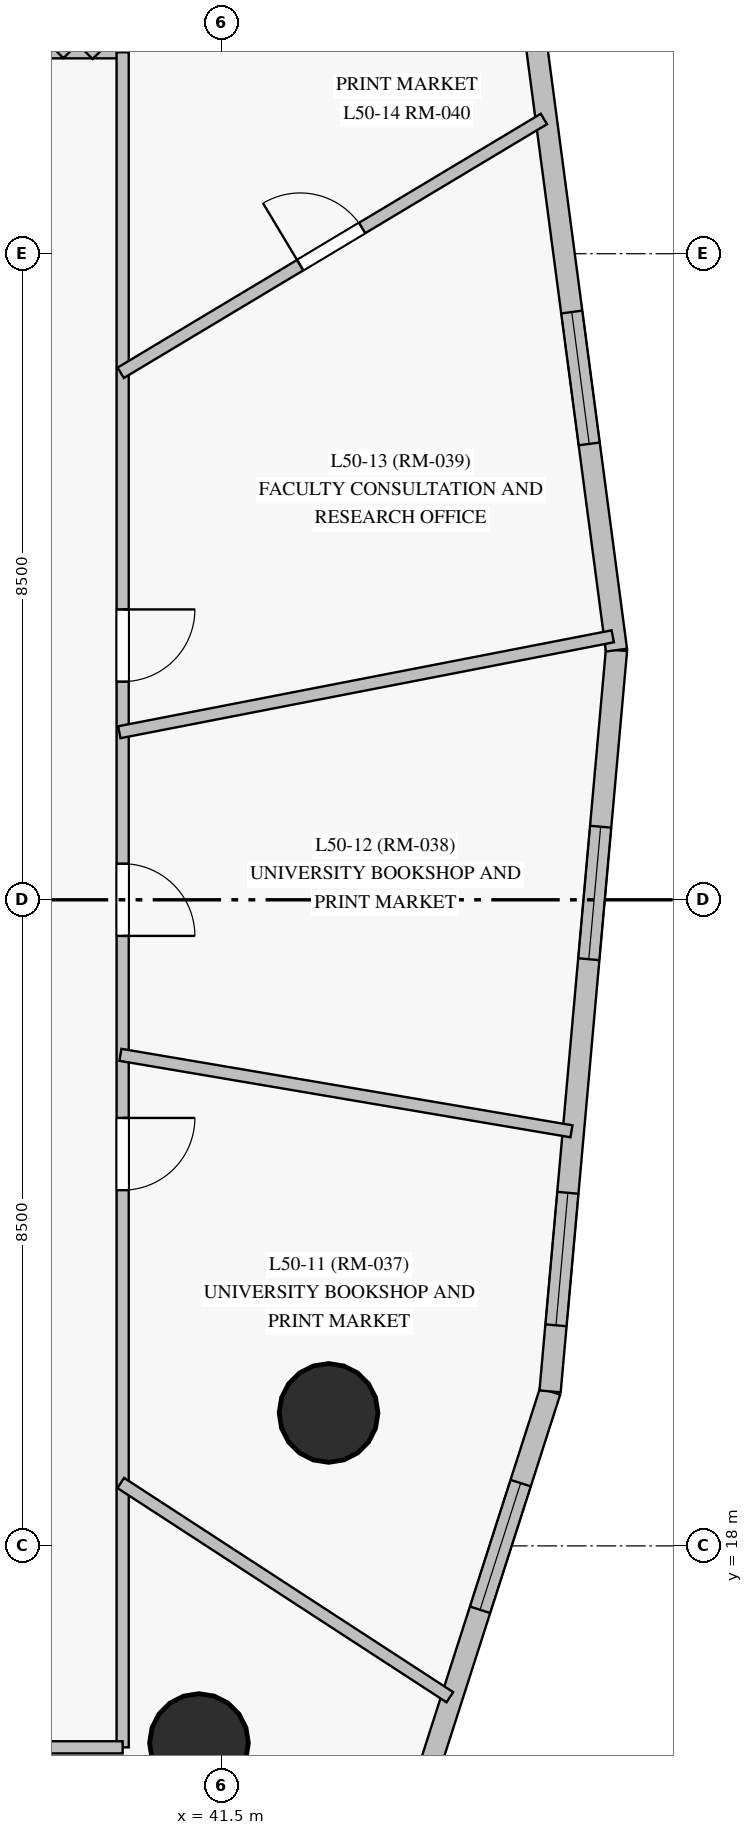
"""IFC4 building model, lengths in metres.
Left out: names, types, materials, properties, quantities, classifications, styles, units other than length and angle.
Written with IfcOpenShell. Run it as: python <this file> out.ifc"""

import sys

from ifc_helpers import new_model, si_unit, direction, frame, frame_2d, origin, origin_with_axes, origin_2d, place, context, subcontext, project, spatial, rectangle, circle, extrude, source, transform, mapped, element, fill, save


model = new_model("IFC4")
c1 = context("Model", 3, precision=1e-05, world=origin(), true_north=direction((0.0, 1.0)))
c2 = subcontext(c1, "Body", "Model", "MODEL_VIEW")
j1 = project(units=[si_unit("LENGTHUNIT", "METRE"), si_unit("PLANEANGLEUNIT", "RADIAN")], contexts=[c1])
p1 = place(None, origin())
s1 = spatial("IfcSite", under=j1, at=p1, CompositionType="ELEMENT")
p2 = place(p1, origin())
s2 = spatial("IfcBuilding", under=s1, at=p2, CompositionType="ELEMENT")
p3 = place(p2, frame((0.0, 0.0, 174.85)))
s3 = spatial("IfcBuildingStorey", under=s2, at=p3, CompositionType="ELEMENT", Elevation=174.85)
m1 = source(origin_with_axes(), c2, "Body", "SweptSolid", [
    extrude(circle(Radius=0.65, at=origin_2d()), origin(), (0.0, 0.0, 1.0), 3.05),
])
for number, where, z_axis, x_axis in (
    (1, (42.909, 19.749, 0.0), (0.0, 0.0, 1.0), (1.0, 0.0, 0.0)),
    (2, (41.204, 15.406, 0.0), (0.0, 0.0, 1.0), (1.0, 0.0, 0.0)),
):
    element("IfcColumn", number, at=place(p3, frame(where, z_axis=z_axis, x_axis=x_axis)), inside=s3, PredefinedType="COLUMN", context=c2, shape_type="MappedRepresentation", body=[
        mapped(m1, transform((0.0, 0.0, 0.0), scale=1.0)),
    ])
p4 = place(p3, frame((43.142, 11.669, 0.0), z_axis=(0.0, 0.0, 1.0), x_axis=(0.305307233787, 0.95225390154, 0.0)))
e3 = element("IfcWall", 3, at=p4, inside=s3, PredefinedType="SOLIDWALL", context=c2, shape_type="SweptSolid", body=[
    extrude(rectangle(XDim=8.783, YDim=0.28, at=frame_2d((4.391, 0.0))), origin(), (0.0, 0.0, 1.0), 2.825),
])
p5 = place(p4, frame((1.434, 0.0, 0.85)))
e4 = element("IfcOpeningElement", 4, at=p5, cuts=e3, PredefinedType="OPENING", context=c2, shape_type="SweptSolid", body=[
    extrude(rectangle(XDim=1.75, YDim=1.65, at=frame_2d((0.875, 0.825))), frame((0.0, 0.15, 0.0), z_axis=(0.0, -1.0, 0.0), x_axis=(1.0, 0.0, 0.0)), (0.0, 0.0, 1.0), 0.3),
])
p6 = place(p4, frame((5.765, 0.0, 0.85)))
e5 = element("IfcOpeningElement", 5, at=p6, cuts=e3, PredefinedType="OPENING", context=c2, shape_type="SweptSolid", body=[
    extrude(rectangle(XDim=1.75, YDim=1.65, at=frame_2d((0.875, 0.825))), frame((0.0, 0.15, 0.0), z_axis=(0.0, -1.0, 0.0), x_axis=(1.0, 0.0, 0.0)), (0.0, 0.0, 1.0), 0.3),
])
p7 = place(p3, frame((45.823, 20.033, 0.0), z_axis=(0.0, 0.0, 1.0), x_axis=(0.089242924974, 0.996009889681, 0.0)))
e6 = element("IfcWall", 6, at=p7, inside=s3, PredefinedType="SOLIDWALL", context=c2, shape_type="SweptSolid", body=[
    extrude(rectangle(XDim=9.791, YDim=0.28, at=frame_2d((4.896, 0.0))), origin(), (0.0, 0.0, 1.0), 2.825),
])
p8 = place(p7, frame((0.873, 0.0, 0.85)))
e7 = element("IfcOpeningElement", 7, at=p8, cuts=e6, PredefinedType="OPENING", context=c2, shape_type="SweptSolid", body=[
    extrude(rectangle(XDim=1.75, YDim=1.65, at=frame_2d((0.875, 0.825))), frame((0.0, 0.15, 0.0), z_axis=(0.0, -1.0, 0.0), x_axis=(1.0, 0.0, 0.0)), (0.0, 0.0, 1.0), 0.3),
])
p9 = place(p7, frame((5.708, 0.0, 0.85)))
e8 = element("IfcOpeningElement", 8, at=p9, cuts=e6, PredefinedType="OPENING", context=c2, shape_type="SweptSolid", body=[
    extrude(rectangle(XDim=1.75, YDim=1.65, at=frame_2d((0.875, 0.825))), frame((0.0, 0.15, 0.0), z_axis=(0.0, -1.0, 0.0), x_axis=(1.0, 0.0, 0.0)), (0.0, 0.0, 1.0), 0.3),
])
p10 = place(p3, frame((46.697, 29.785, 0.0), z_axis=(0.0, 0.0, 1.0), x_axis=(-0.131149267022, 0.991362632824, 0.0)))
e9 = element("IfcWall", 9, at=p10, inside=s3, PredefinedType="SOLIDWALL", context=c2, shape_type="SweptSolid", body=[
    extrude(rectangle(XDim=14.125, YDim=0.28, at=frame_2d((7.063, 0.0))), origin(), (0.0, 0.0, 1.0), 2.825),
])
p11 = place(p10, frame((2.737, 0.0, 0.85)))
e10 = element("IfcOpeningElement", 10, at=p11, cuts=e9, PredefinedType="OPENING", context=c2, shape_type="SweptSolid", body=[
    extrude(rectangle(XDim=1.75, YDim=1.65, at=frame_2d((0.875, 0.825))), frame((0.0, 0.15, 0.0), z_axis=(0.0, -1.0, 0.0), x_axis=(1.0, 0.0, 0.0)), (0.0, 0.0, 1.0), 0.3),
])
p12 = place(p10, frame((9.194, 0.0, 0.85)))
e11 = element("IfcOpeningElement", 11, at=p12, cuts=e9, PredefinedType="OPENING", context=c2, shape_type="SweptSolid", body=[
    extrude(rectangle(XDim=1.75, YDim=1.65, at=frame_2d((0.875, 0.825))), frame((0.0, 0.15, 0.0), z_axis=(0.0, -1.0, 0.0), x_axis=(1.0, 0.0, 0.0)), (0.0, 0.0, 1.0), 0.3),
])
p13 = place(p3, frame((16.7, 37.65, 0.0), z_axis=(0.0, 0.0, 1.0), x_axis=(1.0, 0.0, 0.0)))
e12 = element("IfcWall", 12, at=p13, inside=s3, PredefinedType="PARTITIONING", context=c2, shape_type="SweptSolid", body=[
    extrude(rectangle(XDim=23.5, YDim=0.16, at=frame_2d((11.75, 0.0))), origin(), (0.0, 0.0, 1.0), 2.375),
])
p14 = place(p13, frame((17.15, 0.0, 0.0)))
e13 = element("IfcOpeningElement", 13, at=p14, cuts=e12, PredefinedType="OPENING", context=c2, shape_type="SweptSolid", body=[
    extrude(rectangle(XDim=0.95, YDim=2.15, at=frame_2d((0.475, 1.075))), frame((0.0, 0.09, 0.0), z_axis=(0.0, -1.0, 0.0), x_axis=(1.0, 0.0, 0.0)), (0.0, 0.0, 1.0), 0.18),
])
p15 = place(p13, frame((14.31, 0.0, 0.0)))
e14 = element("IfcOpeningElement", 14, at=p15, cuts=e12, PredefinedType="OPENING", context=c2, shape_type="SweptSolid", body=[
    extrude(rectangle(XDim=0.95, YDim=2.15, at=frame_2d((0.475, 1.075))), frame((0.0, 0.09, 0.0), z_axis=(0.0, -1.0, 0.0), x_axis=(1.0, 0.0, 0.0)), (0.0, 0.0, 1.0), 0.18),
])
p16 = place(p13, frame((11.915, 0.0, 0.0)))
e15 = element("IfcOpeningElement", 15, at=p16, cuts=e12, PredefinedType="OPENING", context=c2, shape_type="SweptSolid", body=[
    extrude(rectangle(XDim=0.95, YDim=2.15, at=frame_2d((0.475, 1.075))), frame((0.0, 0.09, 0.0), z_axis=(0.0, -1.0, 0.0), x_axis=(1.0, 0.0, 0.0)), (0.0, 0.0, 1.0), 0.18),
])
p17 = place(p13, frame((7.75, 0.0, 0.0)))
e16 = element("IfcOpeningElement", 16, at=p17, cuts=e12, PredefinedType="OPENING", context=c2, shape_type="SweptSolid", body=[
    extrude(rectangle(XDim=0.95, YDim=2.15, at=frame_2d((0.475, 1.075))), frame((0.0, 0.09, 0.0), z_axis=(0.0, -1.0, 0.0), x_axis=(1.0, 0.0, 0.0)), (0.0, 0.0, 1.0), 0.18),
])
p18 = place(p13, frame((5.01, 0.0, 0.0)))
e17 = element("IfcOpeningElement", 17, at=p18, cuts=e12, PredefinedType="OPENING", context=c2, shape_type="SweptSolid", body=[
    extrude(rectangle(XDim=0.95, YDim=2.15, at=frame_2d((0.475, 1.075))), frame((0.0, 0.09, 0.0), z_axis=(0.0, -1.0, 0.0), x_axis=(1.0, 0.0, 0.0)), (0.0, 0.0, 1.0), 0.18),
])
p19 = place(p13, frame((0.257, 0.0, 0.0)))
e18 = element("IfcOpeningElement", 18, at=p19, cuts=e12, PredefinedType="OPENING", context=c2, shape_type="SweptSolid", body=[
    extrude(rectangle(XDim=0.95, YDim=2.15, at=frame_2d((0.475, 1.075))), frame((0.0, 0.09, 0.0), z_axis=(0.0, -1.0, 0.0), x_axis=(1.0, 0.0, 0.0)), (0.0, 0.0, 1.0), 0.18),
])
p20 = place(p3, frame((40.2, 37.65, 0.0), z_axis=(0.0, 0.0, 1.0), x_axis=(0.0, -1.0, 0.0)))
e19 = element("IfcWall", 19, at=p20, inside=s3, PredefinedType="PARTITIONING", context=c2, shape_type="SweptSolid", body=[
    extrude(rectangle(XDim=22.3, YDim=0.16, at=frame_2d((11.15, 0.0))), origin(), (0.0, 0.0, 1.0), 2.375),
])
p21 = place(p20, frame((14.02, 0.0, 0.0)))
e20 = element("IfcOpeningElement", 20, at=p21, cuts=e19, PredefinedType="OPENING", context=c2, shape_type="SweptSolid", body=[
    extrude(rectangle(XDim=0.95, YDim=2.15, at=frame_2d((0.475, 1.075))), frame((0.0, 0.09, 0.0), z_axis=(0.0, -1.0, 0.0), x_axis=(1.0, 0.0, 0.0)), (0.0, 0.0, 1.0), 0.18),
])
p22 = place(p20, frame((10.675, 0.0, 0.0)))
e21 = element("IfcOpeningElement", 21, at=p22, cuts=e19, PredefinedType="OPENING", context=c2, shape_type="SweptSolid", body=[
    extrude(rectangle(XDim=0.95, YDim=2.15, at=frame_2d((0.475, 1.075))), frame((0.0, 0.09, 0.0), z_axis=(0.0, -1.0, 0.0), x_axis=(1.0, 0.0, 0.0)), (0.0, 0.0, 1.0), 0.18),
])
p23 = place(p20, frame((7.33, 0.0, 0.0)))
e22 = element("IfcOpeningElement", 22, at=p23, cuts=e19, PredefinedType="OPENING", context=c2, shape_type="SweptSolid", body=[
    extrude(rectangle(XDim=0.95, YDim=2.15, at=frame_2d((0.475, 1.075))), frame((0.0, 0.09, 0.0), z_axis=(0.0, -1.0, 0.0), x_axis=(1.0, 0.0, 0.0)), (0.0, 0.0, 1.0), 0.18),
])
p24 = place(p3, frame((40.2, 15.35, 0.0), z_axis=(0.0, 0.0, 1.0), x_axis=(-1.0, 0.0, 0.0)))
e23 = element("IfcWall", 23, at=p24, inside=s3, PredefinedType="PARTITIONING", context=c2, shape_type="SweptSolid", body=[
    extrude(rectangle(XDim=10.65, YDim=0.16, at=frame_2d((5.325, 0.0))), origin(), (0.0, 0.0, 1.0), 2.275),
])
p25 = place(p24, frame((4.85, 0.0, 0.0)))
e24 = element("IfcOpeningElement", 24, at=p25, cuts=e23, PredefinedType="OPENING", context=c2, shape_type="SweptSolid", body=[
    extrude(rectangle(XDim=0.95, YDim=2.15, at=frame_2d((0.475, 1.075))), frame((0.0, 0.09, 0.0), z_axis=(0.0, -1.0, 0.0), x_axis=(1.0, 0.0, 0.0)), (0.0, 0.0, 1.0), 0.18),
])
p26 = place(p24, frame((1.897, 0.0, 0.0)))
e25 = element("IfcOpeningElement", 25, at=p26, cuts=e23, PredefinedType="OPENING", context=c2, shape_type="SweptSolid", body=[
    extrude(rectangle(XDim=0.95, YDim=2.15, at=frame_2d((0.475, 1.075))), frame((0.0, 0.09, 0.0), z_axis=(0.0, -1.0, 0.0), x_axis=(1.0, 0.0, 0.0)), (0.0, 0.0, 1.0), 0.18),
])
p27 = place(p3, frame((39.748, 37.618, 0.0), z_axis=(0.0, 0.0, 1.0), x_axis=(0.708505208344, 0.705705582909, 0.0)))
e26 = element("IfcWall", 26, at=p27, inside=s3, PredefinedType="PARTITIONING", context=c2, shape_type="SweptSolid", body=[
    extrude(rectangle(XDim=7.325, YDim=0.16, at=frame_2d((3.663, 0.0))), origin(), (0.0, 0.0, 1.0), 2.825),
])
p28 = place(p3, frame((40.156, 28.705, 0.0), z_axis=(0.0, 0.0, 1.0), x_axis=(0.981629797494, 0.190795546784, 0.0)))
e27 = element("IfcWall", 27, at=p28, inside=s3, PredefinedType="PARTITIONING", context=c2, shape_type="SweptSolid", body=[
    extrude(rectangle(XDim=6.613, YDim=0.16, at=frame_2d((3.307, 0.0))), origin(), (0.0, 0.0, 1.0), 2.825),
])
p29 = place(p3, frame((40.174, 33.433, 0.0), z_axis=(0.0, 0.0, 1.0), x_axis=(0.857549328382, 0.514401739297, 0.0)))
e28 = element("IfcWall", 28, at=p29, inside=s3, PredefinedType="PARTITIONING", context=c2, shape_type="SweptSolid", body=[
    extrude(rectangle(XDim=6.492, YDim=0.16, at=frame_2d((3.246, 0.0))), origin(), (0.0, 0.0, 1.0), 2.825),
])
p30 = place(p29, frame((2.754, 0.0, 0.0)))
e29 = element("IfcOpeningElement", 29, at=p30, cuts=e28, PredefinedType="OPENING", context=c2, shape_type="SweptSolid", body=[
    extrude(rectangle(XDim=0.95, YDim=2.15, at=frame_2d((0.475, 1.075))), frame((0.0, 0.09, 0.0), z_axis=(0.0, -1.0, 0.0), x_axis=(1.0, 0.0, 0.0)), (0.0, 0.0, 1.0), 0.18),
])
p31 = place(p3, frame((40.17, 24.46, 0.0), z_axis=(0.0, 0.0, 1.0), x_axis=(0.985928474101, -0.167167712066, 0.0)))
e30 = element("IfcWall", 30, at=p31, inside=s3, PredefinedType="PARTITIONING", context=c2, shape_type="SweptSolid", body=[
    extrude(rectangle(XDim=6.019, YDim=0.16, at=frame_2d((3.009, 0.0))), origin(), (0.0, 0.0, 1.0), 2.825),
])
p32 = place(p3, frame((40.175, 18.828, 0.0), z_axis=(0.0, 0.0, 1.0), x_axis=(0.838056877473, -0.545582871909, 0.0)))
e31 = element("IfcWall", 31, at=p32, inside=s3, PredefinedType="PARTITIONING", context=c2, shape_type="SweptSolid", body=[
    extrude(rectangle(XDim=5.166, YDim=0.16, at=frame_2d((2.583, 0.0))), origin(), (0.0, 0.0, 1.0), 2.825),
])
p33 = place(p3, frame((39.477, 37.629, 0.0), z_axis=(0.0, 0.0, 1.0), x_axis=(-0.707136690743, 0.707076870365, 0.0)))
e32 = element("IfcWall", 32, at=p33, inside=s3, PredefinedType="PARTITIONING", context=c2, shape_type="SweptSolid", body=[
    extrude(rectangle(XDim=4.081, YDim=0.16, at=frame_2d((2.041, 0.0))), origin(), (0.0, 0.0, 1.0), 2.375),
])
p34 = place(p33, frame((1.566, 0.0, 0.0)))
e33 = element("IfcOpeningElement", 33, at=p34, cuts=e32, PredefinedType="OPENING", context=c2, shape_type="SweptSolid", body=[
    extrude(rectangle(XDim=0.95, YDim=2.15, at=frame_2d((0.475, 1.075))), frame((0.0, 0.09, 0.0), z_axis=(0.0, -1.0, 0.0), x_axis=(1.0, 0.0, 0.0)), (0.0, 0.0, 1.0), 0.18),
])
m2 = source(origin_with_axes(), c2, "Body", "SweptSolid", [
    extrude(rectangle(XDim=1.75, YDim=1.65, at=frame_2d((0.875, 0.825))), frame((0.0, 0.03, 0.0), z_axis=(0.0, -1.0, 0.0), x_axis=(1.0, 0.0, 0.0)), (0.0, 0.0, 1.0), 0.06),
])
p35 = place(p6, origin())
e34 = element("IfcWindow", 34, at=p35, inside=s3, PartitioningType="SINGLE_PANEL", PredefinedType="WINDOW", context=c2, shape_type="MappedRepresentation", body=[
    mapped(m2, transform((0.0, 0.0, 0.0), scale=1.0)),
])
fill(e5, e34)
p36 = place(p8, origin())
e35 = element("IfcWindow", 35, at=p36, inside=s3, PartitioningType="SINGLE_PANEL", PredefinedType="WINDOW", context=c2, shape_type="MappedRepresentation", body=[
    mapped(m2, transform((0.0, 0.0, 0.0), scale=1.0)),
])
fill(e7, e35)
p37 = place(p9, origin())
e36 = element("IfcWindow", 36, at=p37, inside=s3, PartitioningType="SINGLE_PANEL", PredefinedType="WINDOW", context=c2, shape_type="MappedRepresentation", body=[
    mapped(m2, transform((0.0, 0.0, 0.0), scale=1.0)),
])
fill(e8, e36)
p38 = place(p11, origin())
e37 = element("IfcWindow", 37, at=p38, inside=s3, PartitioningType="SINGLE_PANEL", PredefinedType="WINDOW", context=c2, shape_type="MappedRepresentation", body=[
    mapped(m2, transform((0.0, 0.0, 0.0), scale=1.0)),
])
fill(e10, e37)
m3 = source(origin_with_axes(), c2, "Body", "SweptSolid", [
    extrude(rectangle(XDim=0.95, YDim=2.15, at=frame_2d((0.475, 1.075))), frame((0.0, 0.025, 0.0), z_axis=(0.0, -1.0, 0.0), x_axis=(1.0, 0.0, 0.0)), (0.0, 0.0, 1.0), 0.05),
])
p39 = place(p21, origin())
e38 = element("IfcDoor", 38, at=p39, inside=s3, OperationType="SINGLE_SWING_LEFT", PredefinedType="DOOR", context=c2, shape_type="MappedRepresentation", body=[
    mapped(m3, transform((0.0, 0.0, 0.0), scale=1.0)),
])
fill(e20, e38)
p40 = place(p22, origin())
e39 = element("IfcDoor", 39, at=p40, inside=s3, OperationType="SINGLE_SWING_RIGHT", PredefinedType="DOOR", context=c2, shape_type="MappedRepresentation", body=[
    mapped(m3, transform((0.0, 0.0, 0.0), scale=1.0)),
])
fill(e21, e39)
p41 = place(p23, origin())
e40 = element("IfcDoor", 40, at=p41, inside=s3, OperationType="SINGLE_SWING_LEFT", PredefinedType="DOOR", context=c2, shape_type="MappedRepresentation", body=[
    mapped(m3, transform((0.0, 0.0, 0.0), scale=1.0)),
])
fill(e22, e40)
p42 = place(p30, origin())
e41 = element("IfcDoor", 41, at=p42, inside=s3, OperationType="SINGLE_SWING_LEFT", PredefinedType="DOOR", context=c2, shape_type="MappedRepresentation", body=[
    mapped(m3, transform((0.0, 0.0, 0.0), scale=1.0)),
])
fill(e29, e41)
save(model, sys.argv[1])
